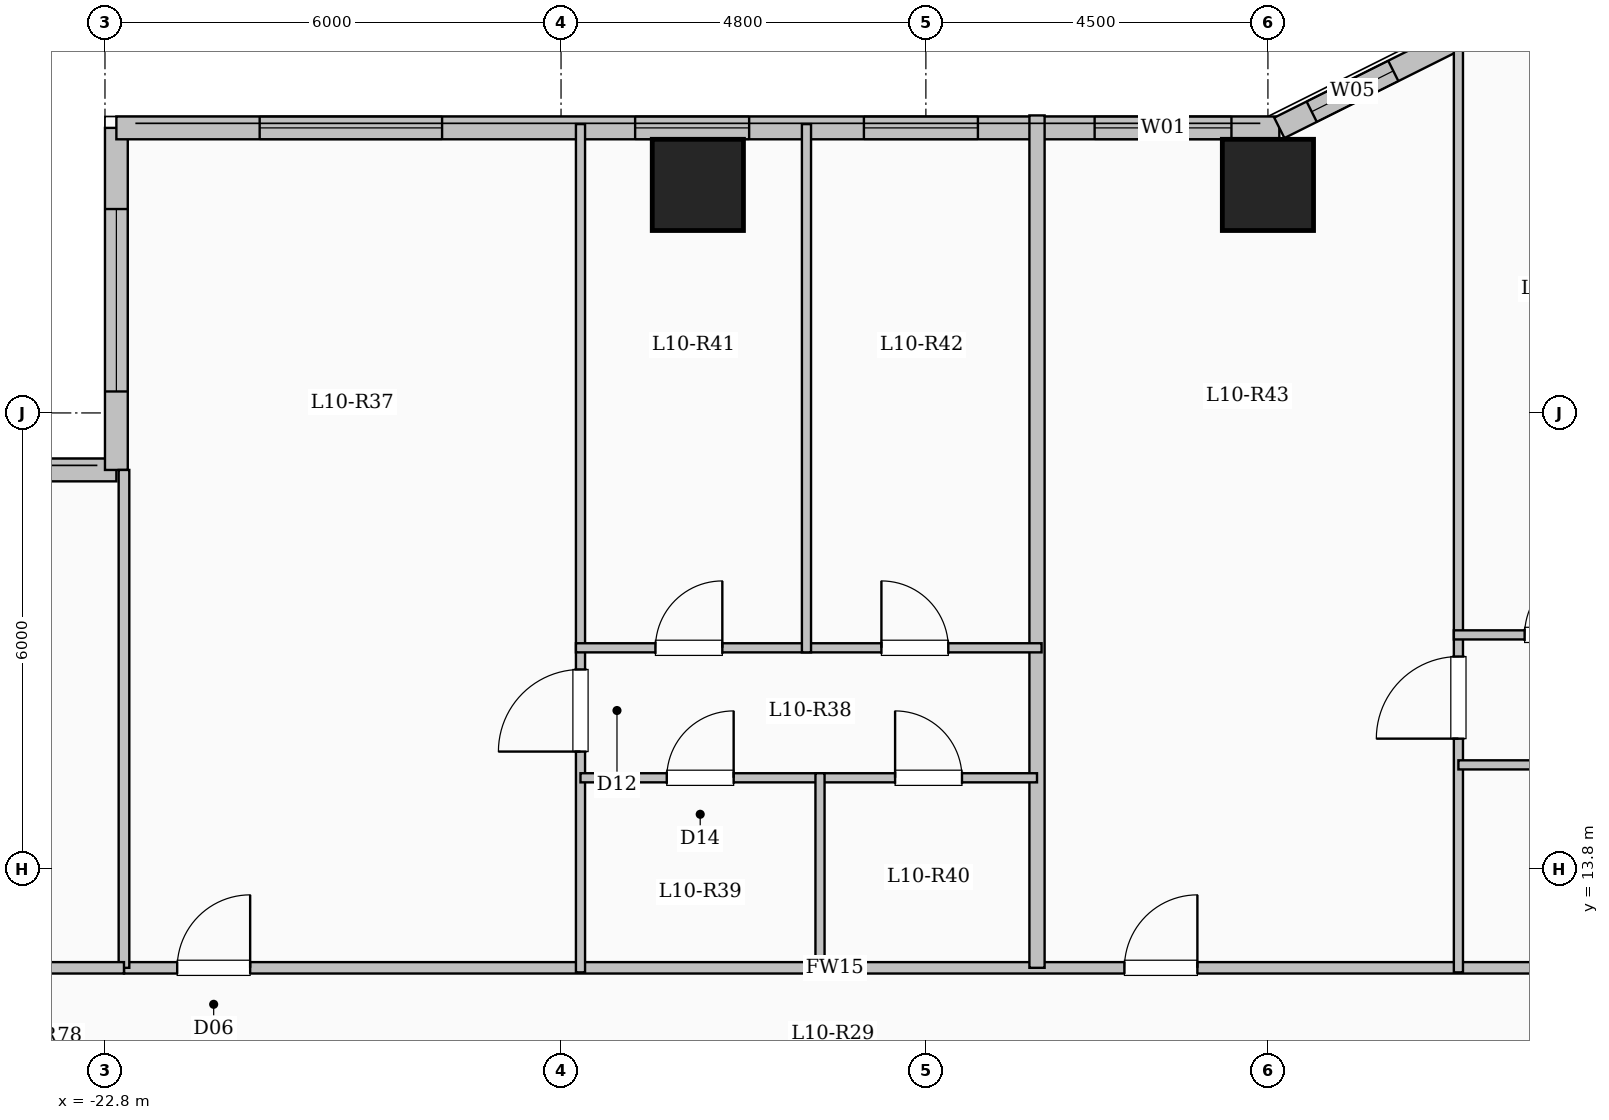
"""IFC4 building model, lengths in metres.
Left out: names, types, materials, properties, quantities, classifications, styles, units other than length and angle.
Written with IfcOpenShell. Run it as: python <this file> out.ifc"""

import sys

from ifc_helpers import new_model, si_unit, direction, frame, frame_2d, origin, origin_2d, place, context, subcontext, project, spatial, rectangle, extrude, element, fill, save


model = new_model("IFC4")
c1 = context("Model", 3, precision=1e-05, world=origin(), true_north=direction((0.0, 1.0)))
c2 = subcontext(c1, "Body", "Model", "MODEL_VIEW")
j1 = project(units=[si_unit("LENGTHUNIT", "METRE"), si_unit("PLANEANGLEUNIT", "RADIAN")], contexts=[c1])
p1 = place(None, origin())
s1 = spatial("IfcSite", under=j1, at=p1, CompositionType="ELEMENT")
p2 = place(p1, origin())
s2 = spatial("IfcBuilding", under=s1, at=p2, CompositionType="ELEMENT")
p3 = place(p2, frame((0.0, 0.0, 40.75)))
s3 = spatial("IfcBuildingStorey", under=s2, at=p3, CompositionType="ELEMENT", Elevation=40.75)
for number, where, z_axis, x_axis in (
    (1, (-15.0, 22.8, 0.0), (0.0, 0.0, 1.0), (1.0, 0.0, 0.0)),
    (2, (-7.5, 22.8, 0.0), (0.0, 0.0, 1.0), (1.0, 0.0, 0.0)),
):
    element("IfcColumn", number, at=place(p3, frame(where, z_axis=z_axis, x_axis=x_axis)), inside=s3, PredefinedType="COLUMN", context=c2, shape_type="SweptSolid", body=[
        extrude(rectangle(XDim=1.2, YDim=1.2, at=origin_2d()), origin(), (0.0, 0.0, 1.0), 3.35),
    ])
p4 = place(p3, frame((-28.65, 19.05, 0.0), z_axis=(0.0, 0.0, 1.0), x_axis=(1.0, 0.0, 0.0)))
e3 = element("IfcWall", 3, at=p4, inside=s3, PredefinedType="SOLIDWALL", context=c2, shape_type="SweptSolid", body=[
    extrude(rectangle(XDim=6.0, YDim=0.3, at=frame_2d((3.0, 0.0))), origin(), (0.0, 0.0, 1.0), 3.1),
])
p5 = place(p4, frame((2.025, 0.0, 0.9)))
e4 = element("IfcOpeningElement", 4, at=p5, cuts=e3, PredefinedType="OPENING", context=c2, shape_type="SweptSolid", body=[
    extrude(rectangle(XDim=2.0, YDim=1.7, at=frame_2d((1.0, 0.85))), frame((0.0, 0.16, 0.0), z_axis=(0.0, -1.0, 0.0), x_axis=(1.0, 0.0, 0.0)), (0.0, 0.0, 1.0), 0.32),
])
p6 = place(p3, frame((-22.65, 19.05, 0.0), z_axis=(0.0, 0.0, 1.0), x_axis=(0.0, 1.0, 0.0)))
e5 = element("IfcWall", 5, at=p6, inside=s3, PredefinedType="SOLIDWALL", context=c2, shape_type="SweptSolid", body=[
    extrude(rectangle(XDim=4.5, YDim=0.3, at=frame_2d((2.25, 0.0))), origin(), (0.0, 0.0, 1.0), 3.1),
])
p7 = place(p6, frame((1.032, 0.0, 0.9)))
e6 = element("IfcOpeningElement", 6, at=p7, cuts=e5, PredefinedType="OPENING", context=c2, shape_type="SweptSolid", body=[
    extrude(rectangle(XDim=2.4, YDim=1.8, at=frame_2d((1.2, 0.9))), frame((0.0, 0.16, 0.0), z_axis=(0.0, -1.0, 0.0), x_axis=(1.0, 0.0, 0.0)), (0.0, 0.0, 1.0), 0.32),
])
p8 = place(p3, frame((-22.65, 23.55, 0.0), z_axis=(0.0, 0.0, 1.0), x_axis=(1.0, 0.0, 0.0)))
e7 = element("IfcWall", 7, at=p8, inside=s3, PredefinedType="SOLIDWALL", context=c2, shape_type="SweptSolid", body=[
    extrude(rectangle(XDim=15.3, YDim=0.3, at=frame_2d((7.65, 0.0))), origin(), (0.0, 0.0, 1.0), 3.1),
])
p9 = place(p8, frame((1.885, 0.0, 0.9)))
e8 = element("IfcOpeningElement", 8, at=p9, cuts=e7, PredefinedType="OPENING", context=c2, shape_type="SweptSolid", body=[
    extrude(rectangle(XDim=2.4, YDim=1.8, at=frame_2d((1.2, 0.9))), frame((0.0, 0.16, 0.0), z_axis=(0.0, -1.0, 0.0), x_axis=(1.0, 0.0, 0.0)), (0.0, 0.0, 1.0), 0.32),
])
p10 = place(p8, frame((6.825, 0.0, 0.9)))
e9 = element("IfcOpeningElement", 9, at=p10, cuts=e7, PredefinedType="OPENING", context=c2, shape_type="SweptSolid", body=[
    extrude(rectangle(XDim=1.5, YDim=1.65, at=frame_2d((0.75, 0.825))), frame((0.0, 0.16, 0.0), z_axis=(0.0, -1.0, 0.0), x_axis=(1.0, 0.0, 0.0)), (0.0, 0.0, 1.0), 0.32),
])
p11 = place(p8, frame((9.835, 0.0, 0.9)))
e10 = element("IfcOpeningElement", 10, at=p11, cuts=e7, PredefinedType="OPENING", context=c2, shape_type="SweptSolid", body=[
    extrude(rectangle(XDim=1.5, YDim=1.65, at=frame_2d((0.75, 0.825))), frame((0.0, 0.16, 0.0), z_axis=(0.0, -1.0, 0.0), x_axis=(1.0, 0.0, 0.0)), (0.0, 0.0, 1.0), 0.32),
])
p12 = place(p8, frame((12.87, 0.0, 0.9)))
e11 = element("IfcOpeningElement", 11, at=p12, cuts=e7, PredefinedType="OPENING", context=c2, shape_type="SweptSolid", body=[
    extrude(rectangle(XDim=1.8, YDim=1.65, at=frame_2d((0.9, 0.825))), frame((0.0, 0.16, 0.0), z_axis=(0.0, -1.0, 0.0), x_axis=(1.0, 0.0, 0.0)), (0.0, 0.0, 1.0), 0.32),
])
p13 = place(p3, frame((-7.35, 23.55, 0.0), z_axis=(0.0, 0.0, 1.0), x_axis=(0.894427191, 0.4472135955, 0.0)))
e12 = element("IfcWall", 12, at=p13, inside=s3, PredefinedType="SOLIDWALL", context=c2, shape_type="SweptSolid", body=[
    extrude(rectangle(XDim=3.354, YDim=0.3, at=frame_2d((1.677, 0.0))), origin(), (0.0, 0.0, 1.0), 3.1),
])
p14 = place(p13, frame((0.476, 0.0, 0.95)))
e13 = element("IfcOpeningElement", 13, at=p14, cuts=e12, PredefinedType="OPENING", context=c2, shape_type="SweptSolid", body=[
    extrude(rectangle(XDim=1.2, YDim=1.5, at=frame_2d((0.6, 0.75))), frame((0.0, 0.16, 0.0), z_axis=(0.0, -1.0, 0.0), x_axis=(1.0, 0.0, 0.0)), (0.0, 0.0, 1.0), 0.32),
])
p15 = place(p3, frame((-22.55, 12.5, 0.0), z_axis=(0.0, 0.0, 1.0), x_axis=(1.0, 0.0, 0.0)))
e14 = element("IfcWall", 14, at=p15, inside=s3, PredefinedType="PARTITIONING", context=c2, shape_type="SweptSolid", body=[
    extrude(rectangle(XDim=18.7, YDim=0.15, at=frame_2d((9.35, 0.0))), origin(), (0.0, 0.0, 1.0), 3.1),
])
p16 = place(p15, frame((0.7, 0.0, 0.0)))
e15 = element("IfcOpeningElement", 15, at=p16, cuts=e14, PredefinedType="OPENING", context=c2, shape_type="SweptSolid", body=[
    extrude(rectangle(XDim=0.96, YDim=2.15, at=frame_2d((0.48, 1.075))), frame((0.0, 0.085, 0.0), z_axis=(0.0, -1.0, 0.0), x_axis=(1.0, 0.0, 0.0)), (0.0, 0.0, 1.0), 0.17),
])
p17 = place(p15, frame((13.162, 0.0, 0.0)))
e16 = element("IfcOpeningElement", 16, at=p17, cuts=e14, PredefinedType="OPENING", context=c2, shape_type="SweptSolid", body=[
    extrude(rectangle(XDim=0.96, YDim=2.15, at=frame_2d((0.48, 1.075))), frame((0.0, 0.085, 0.0), z_axis=(0.0, -1.0, 0.0), x_axis=(1.0, 0.0, 0.0)), (0.0, 0.0, 1.0), 0.17),
])
p18 = place(p3, frame((-10.538, 12.5, 0.0), z_axis=(0.0, 0.0, 1.0), x_axis=(0.0, 1.0, 0.0)))
e17 = element("IfcWall", 17, at=p18, inside=s3, PredefinedType="SOLIDWALL", context=c2, shape_type="SweptSolid", body=[
    extrude(rectangle(XDim=11.214, YDim=0.2, at=frame_2d((5.607, 0.0))), origin(), (0.0, 0.0, 1.0), 3.1),
])
p19 = place(p3, frame((-16.544, 12.44, 0.0), z_axis=(0.0, 0.0, 1.0), x_axis=(0.0, 1.0, 0.0)))
e18 = element("IfcWall", 18, at=p19, inside=s3, PredefinedType="PARTITIONING", context=c2, shape_type="SweptSolid", body=[
    extrude(rectangle(XDim=11.16, YDim=0.12, at=frame_2d((5.58, 0.0))), origin(), (0.0, 0.0, 1.0), 3.1),
])
p20 = place(p19, frame((2.905, 0.0, 0.0)))
e19 = element("IfcOpeningElement", 19, at=p20, cuts=e18, PredefinedType="OPENING", context=c2, shape_type="SweptSolid", body=[
    extrude(rectangle(XDim=1.08, YDim=2.15, at=frame_2d((0.54, 1.075))), frame((0.0, 0.07, 0.0), z_axis=(0.0, -1.0, 0.0), x_axis=(1.0, 0.0, 0.0)), (0.0, 0.0, 1.0), 0.14),
])
p21 = place(p3, frame((-16.544, 15.0, 0.0), z_axis=(0.0, 0.0, 1.0), x_axis=(1.0, 0.0, 0.0)))
e20 = element("IfcWall", 20, at=p21, inside=s3, PredefinedType="PARTITIONING", context=c2, shape_type="SweptSolid", body=[
    extrude(rectangle(XDim=3.151, YDim=0.12, at=frame_2d((1.575, 0.0))), origin(), (0.0, 0.0, 1.0), 2.585),
])
p22 = place(p21, frame((1.135, 0.0, 0.0)))
e21 = element("IfcOpeningElement", 21, at=p22, cuts=e20, PredefinedType="OPENING", context=c2, shape_type="SweptSolid", body=[
    extrude(rectangle(XDim=0.88, YDim=2.1, at=frame_2d((0.44, 1.05))), frame((0.0, 0.07, 0.0), z_axis=(0.0, -1.0, 0.0), x_axis=(1.0, 0.0, 0.0)), (0.0, 0.0, 1.0), 0.14),
])
p23 = place(p3, frame((-13.393, 15.0, 0.0), z_axis=(0.0, 0.0, 1.0), x_axis=(1.0, 0.0, 0.0)))
e22 = element("IfcWall", 22, at=p23, inside=s3, PredefinedType="PARTITIONING", context=c2, shape_type="SweptSolid", body=[
    extrude(rectangle(XDim=2.855, YDim=0.12, at=frame_2d((1.427, 0.0))), origin(), (0.0, 0.0, 1.0), 2.585),
])
p24 = place(p23, frame((0.988, 0.0, 0.0)))
e23 = element("IfcOpeningElement", 23, at=p24, cuts=e22, PredefinedType="OPENING", context=c2, shape_type="SweptSolid", body=[
    extrude(rectangle(XDim=0.88, YDim=2.1, at=frame_2d((0.44, 1.05))), frame((0.0, 0.07, 0.0), z_axis=(0.0, -1.0, 0.0), x_axis=(1.0, 0.0, 0.0)), (0.0, 0.0, 1.0), 0.14),
])
p25 = place(p3, frame((-16.604, 16.71, 0.0), z_axis=(0.0, 0.0, 1.0), x_axis=(1.0, 0.0, 0.0)))
e24 = element("IfcWall", 24, at=p25, inside=s3, PredefinedType="PARTITIONING", context=c2, shape_type="SweptSolid", body=[
    extrude(rectangle(XDim=6.126, YDim=0.12, at=frame_2d((3.063, 0.0))), origin(), (0.0, 0.0, 1.0), 2.585),
])
p26 = place(p25, frame((1.046, 0.0, 0.0)))
e25 = element("IfcOpeningElement", 25, at=p26, cuts=e24, PredefinedType="OPENING", context=c2, shape_type="SweptSolid", body=[
    extrude(rectangle(XDim=0.88, YDim=2.1, at=frame_2d((0.44, 1.05))), frame((0.0, 0.07, 0.0), z_axis=(0.0, -1.0, 0.0), x_axis=(1.0, 0.0, 0.0)), (0.0, 0.0, 1.0), 0.14),
])
p27 = place(p25, frame((4.019, 0.0, 0.0)))
e26 = element("IfcOpeningElement", 26, at=p27, cuts=e24, PredefinedType="OPENING", context=c2, shape_type="SweptSolid", body=[
    extrude(rectangle(XDim=0.88, YDim=2.1, at=frame_2d((0.44, 1.05))), frame((0.0, 0.07, 0.0), z_axis=(0.0, -1.0, 0.0), x_axis=(1.0, 0.0, 0.0)), (0.0, 0.0, 1.0), 0.14),
])
p28 = place(p3, frame((-13.393, 12.44, 0.0), z_axis=(0.0, 0.0, 1.0), x_axis=(0.0, 1.0, 0.0)))
e27 = element("IfcWall", 27, at=p28, inside=s3, PredefinedType="PARTITIONING", context=c2, shape_type="SweptSolid", body=[
    extrude(rectangle(XDim=2.62, YDim=0.12, at=frame_2d((1.31, 0.0))), origin(), (0.0, 0.0, 1.0), 3.1),
])
p29 = place(p3, frame((-13.571, 16.65, 0.0), z_axis=(0.0, 0.0, 1.0), x_axis=(0.0, 1.0, 0.0)))
e28 = element("IfcWall", 28, at=p29, inside=s3, PredefinedType="PARTITIONING", context=c2, shape_type="SweptSolid", body=[
    extrude(rectangle(XDim=6.95, YDim=0.12, at=frame_2d((3.475, 0.0))), origin(), (0.0, 0.0, 1.0), 3.1),
])
p30 = place(p3, frame((-4.994, 12.44, 0.0), z_axis=(0.0, 0.0, 1.0), x_axis=(0.0, 1.0, 0.0)))
e29 = element("IfcWall", 29, at=p30, inside=s3, PredefinedType="PARTITIONING", context=c2, shape_type="SweptSolid", body=[
    extrude(rectangle(XDim=12.64, YDim=0.12, at=frame_2d((6.32, 0.0))), origin(), (0.0, 0.0, 1.0), 3.1),
])
p31 = place(p30, frame((3.075, 0.0, 0.0)))
e30 = element("IfcOpeningElement", 30, at=p31, cuts=e29, PredefinedType="OPENING", context=c2, shape_type="SweptSolid", body=[
    extrude(rectangle(XDim=1.08, YDim=2.15, at=frame_2d((0.54, 1.075))), frame((0.0, 0.07, 0.0), z_axis=(0.0, -1.0, 0.0), x_axis=(1.0, 0.0, 0.0)), (0.0, 0.0, 1.0), 0.14),
])
p32 = place(p3, frame((-4.994, 15.17, 0.0), z_axis=(0.0, 0.0, 1.0), x_axis=(1.0, 0.0, 0.0)))
e31 = element("IfcWall", 31, at=p32, inside=s3, PredefinedType="PARTITIONING", context=c2, shape_type="SweptSolid", body=[
    extrude(rectangle(XDim=3.126, YDim=0.12, at=frame_2d((1.563, 0.0))), origin(), (0.0, 0.0, 1.0), 3.1),
])
p33 = place(p32, frame((1.123, 0.0, 0.0)))
e32 = element("IfcOpeningElement", 32, at=p33, cuts=e31, PredefinedType="OPENING", context=c2, shape_type="SweptSolid", body=[
    extrude(rectangle(XDim=0.88, YDim=2.1, at=frame_2d((0.44, 1.05))), frame((0.0, 0.07, 0.0), z_axis=(0.0, -1.0, 0.0), x_axis=(1.0, 0.0, 0.0)), (0.0, 0.0, 1.0), 0.14),
])
p34 = place(p3, frame((-5.054, 16.88, 0.0), z_axis=(0.0, 0.0, 1.0), x_axis=(1.0, 0.0, 0.0)))
e33 = element("IfcWall", 33, at=p34, inside=s3, PredefinedType="PARTITIONING", context=c2, shape_type="SweptSolid", body=[
    extrude(rectangle(XDim=5.664, YDim=0.12, at=frame_2d((2.832, 0.0))), origin(), (0.0, 0.0, 1.0), 3.1),
])
p35 = place(p34, frame((0.931, 0.0, 0.0)))
e34 = element("IfcOpeningElement", 34, at=p35, cuts=e33, PredefinedType="OPENING", context=c2, shape_type="SweptSolid", body=[
    extrude(rectangle(XDim=0.88, YDim=2.1, at=frame_2d((0.44, 1.05))), frame((0.0, 0.07, 0.0), z_axis=(0.0, -1.0, 0.0), x_axis=(1.0, 0.0, 0.0)), (0.0, 0.0, 1.0), 0.14),
])
p36 = place(p34, frame((3.673, 0.0, 0.0)))
e35 = element("IfcOpeningElement", 35, at=p36, cuts=e33, PredefinedType="OPENING", context=c2, shape_type="SweptSolid", body=[
    extrude(rectangle(XDim=0.88, YDim=2.1, at=frame_2d((0.44, 1.05))), frame((0.0, 0.07, 0.0), z_axis=(0.0, -1.0, 0.0), x_axis=(1.0, 0.0, 0.0)), (0.0, 0.0, 1.0), 0.14),
])
p37 = place(p3, frame((-22.55, 12.5, 0.0), z_axis=(0.0, 0.0, 1.0), x_axis=(0.0, 1.0, 0.0)))
e36 = element("IfcWall", 36, at=p37, inside=s3, PredefinedType="PARTITIONING", context=c2, shape_type="SweptSolid", body=[
    extrude(rectangle(XDim=6.55, YDim=0.14, at=frame_2d((3.275, 0.0))), origin(), (0.0, 0.0, 1.0), 3.1),
])
p38 = place(p3, frame((-28.68, 12.5, 0.0), z_axis=(0.0, 0.0, 1.0), x_axis=(1.0, 0.0, 0.0)))
e37 = element("IfcWall", 37, at=p38, inside=s3, PredefinedType="PARTITIONING", context=c2, shape_type="SweptSolid", body=[
    extrude(rectangle(XDim=6.13, YDim=0.15, at=frame_2d((3.065, 0.0))), origin(), (0.0, 0.0, 1.0), 3.1),
])
p39 = place(p38, frame((2.59, 0.0, 0.0)))
e38 = element("IfcOpeningElement", 38, at=p39, cuts=e37, PredefinedType="OPENING", context=c2, shape_type="SweptSolid", body=[
    extrude(rectangle(XDim=0.95, YDim=2.15, at=frame_2d((0.475, 1.075))), frame((0.0, 0.085, 0.0), z_axis=(0.0, -1.0, 0.0), x_axis=(1.0, 0.0, 0.0)), (0.0, 0.0, 1.0), 0.17),
])
p40 = place(p7, origin())
e39 = element("IfcWindow", 39, at=p40, inside=s3, PartitioningType="SINGLE_PANEL", PredefinedType="WINDOW", context=c2, shape_type="SweptSolid", body=[
    extrude(rectangle(XDim=2.4, YDim=1.8, at=frame_2d((1.2, 0.9))), frame((0.0, 0.03, 0.0), z_axis=(0.0, -1.0, 0.0), x_axis=(1.0, 0.0, 0.0)), (0.0, 0.0, 1.0), 0.06),
])
fill(e6, e39)
p41 = place(p9, origin())
e40 = element("IfcWindow", 40, at=p41, inside=s3, PartitioningType="SINGLE_PANEL", PredefinedType="WINDOW", context=c2, shape_type="SweptSolid", body=[
    extrude(rectangle(XDim=2.4, YDim=1.8, at=frame_2d((1.2, 0.9))), frame((0.0, 0.03, 0.0), z_axis=(0.0, -1.0, 0.0), x_axis=(1.0, 0.0, 0.0)), (0.0, 0.0, 1.0), 0.06),
])
fill(e8, e40)
p42 = place(p10, origin())
e41 = element("IfcWindow", 41, at=p42, inside=s3, PartitioningType="SINGLE_PANEL", PredefinedType="WINDOW", context=c2, shape_type="SweptSolid", body=[
    extrude(rectangle(XDim=1.5, YDim=1.65, at=frame_2d((0.75, 0.825))), frame((0.0, 0.03, 0.0), z_axis=(0.0, -1.0, 0.0), x_axis=(1.0, 0.0, 0.0)), (0.0, 0.0, 1.0), 0.06),
])
fill(e9, e41)
p43 = place(p11, origin())
e42 = element("IfcWindow", 42, at=p43, inside=s3, PartitioningType="SINGLE_PANEL", PredefinedType="WINDOW", context=c2, shape_type="SweptSolid", body=[
    extrude(rectangle(XDim=1.5, YDim=1.65, at=frame_2d((0.75, 0.825))), frame((0.0, 0.03, 0.0), z_axis=(0.0, -1.0, 0.0), x_axis=(1.0, 0.0, 0.0)), (0.0, 0.0, 1.0), 0.06),
])
fill(e10, e42)
p44 = place(p12, origin())
e43 = element("IfcWindow", 43, at=p44, inside=s3, PartitioningType="SINGLE_PANEL", PredefinedType="WINDOW", context=c2, shape_type="SweptSolid", body=[
    extrude(rectangle(XDim=1.8, YDim=1.65, at=frame_2d((0.9, 0.825))), frame((0.0, 0.03, 0.0), z_axis=(0.0, -1.0, 0.0), x_axis=(1.0, 0.0, 0.0)), (0.0, 0.0, 1.0), 0.06),
])
fill(e11, e43)
p45 = place(p14, origin())
e44 = element("IfcWindow", 44, at=p45, inside=s3, PartitioningType="SINGLE_PANEL", PredefinedType="WINDOW", context=c2, shape_type="SweptSolid", body=[
    extrude(rectangle(XDim=1.2, YDim=1.5, at=frame_2d((0.6, 0.75))), frame((0.0, 0.03, 0.0), z_axis=(0.0, -1.0, 0.0), x_axis=(1.0, 0.0, 0.0)), (0.0, 0.0, 1.0), 0.06),
])
fill(e13, e44)
p46 = place(p16, origin())
e45 = element("IfcDoor", 45, at=p46, inside=s3, OperationType="SINGLE_SWING_RIGHT", PredefinedType="DOOR", context=c2, shape_type="SweptSolid", body=[
    extrude(rectangle(XDim=0.96, YDim=2.15, at=frame_2d((0.48, 1.075))), frame((0.0, 0.025, 0.0), z_axis=(0.0, -1.0, 0.0), x_axis=(1.0, 0.0, 0.0)), (0.0, 0.0, 1.0), 0.05),
])
fill(e15, e45)
p47 = place(p20, origin())
e46 = element("IfcDoor", 46, at=p47, inside=s3, OperationType="SINGLE_SWING_LEFT", PredefinedType="DOOR", context=c2, shape_type="SweptSolid", body=[
    extrude(rectangle(XDim=1.08, YDim=2.15, at=frame_2d((0.54, 1.075))), frame((0.0, 0.025, 0.0), z_axis=(0.0, -1.0, 0.0), x_axis=(1.0, 0.0, 0.0)), (0.0, 0.0, 1.0), 0.05),
])
fill(e19, e46)
p48 = place(p22, origin())
e47 = element("IfcDoor", 47, at=p48, inside=s3, OperationType="SINGLE_SWING_RIGHT", PredefinedType="DOOR", context=c2, shape_type="SweptSolid", body=[
    extrude(rectangle(XDim=0.88, YDim=2.1, at=frame_2d((0.44, 1.05))), frame((0.0, 0.025, 0.0), z_axis=(0.0, -1.0, 0.0), x_axis=(1.0, 0.0, 0.0)), (0.0, 0.0, 1.0), 0.05),
])
fill(e21, e47)
p49 = place(p24, origin())
e48 = element("IfcDoor", 48, at=p49, inside=s3, OperationType="SINGLE_SWING_LEFT", PredefinedType="DOOR", context=c2, shape_type="SweptSolid", body=[
    extrude(rectangle(XDim=0.88, YDim=2.1, at=frame_2d((0.44, 1.05))), frame((0.0, 0.025, 0.0), z_axis=(0.0, -1.0, 0.0), x_axis=(1.0, 0.0, 0.0)), (0.0, 0.0, 1.0), 0.05),
])
fill(e23, e48)
p50 = place(p26, origin())
e49 = element("IfcDoor", 49, at=p50, inside=s3, OperationType="SINGLE_SWING_RIGHT", PredefinedType="DOOR", context=c2, shape_type="SweptSolid", body=[
    extrude(rectangle(XDim=0.88, YDim=2.1, at=frame_2d((0.44, 1.05))), frame((0.0, 0.025, 0.0), z_axis=(0.0, -1.0, 0.0), x_axis=(1.0, 0.0, 0.0)), (0.0, 0.0, 1.0), 0.05),
])
fill(e25, e49)
p51 = place(p27, origin())
e50 = element("IfcDoor", 50, at=p51, inside=s3, OperationType="SINGLE_SWING_LEFT", PredefinedType="DOOR", context=c2, shape_type="SweptSolid", body=[
    extrude(rectangle(XDim=0.88, YDim=2.1, at=frame_2d((0.44, 1.05))), frame((0.0, 0.025, 0.0), z_axis=(0.0, -1.0, 0.0), x_axis=(1.0, 0.0, 0.0)), (0.0, 0.0, 1.0), 0.05),
])
fill(e26, e50)
p52 = place(p17, origin())
e51 = element("IfcDoor", 51, at=p52, inside=s3, OperationType="SINGLE_SWING_RIGHT", PredefinedType="DOOR", context=c2, shape_type="SweptSolid", body=[
    extrude(rectangle(XDim=0.96, YDim=2.15, at=frame_2d((0.48, 1.075))), frame((0.0, 0.025, 0.0), z_axis=(0.0, -1.0, 0.0), x_axis=(1.0, 0.0, 0.0)), (0.0, 0.0, 1.0), 0.05),
])
fill(e16, e51)
p53 = place(p31, origin())
e52 = element("IfcDoor", 52, at=p53, inside=s3, OperationType="SINGLE_SWING_LEFT", PredefinedType="DOOR", context=c2, shape_type="SweptSolid", body=[
    extrude(rectangle(XDim=1.08, YDim=2.15, at=frame_2d((0.54, 1.075))), frame((0.0, 0.025, 0.0), z_axis=(0.0, -1.0, 0.0), x_axis=(1.0, 0.0, 0.0)), (0.0, 0.0, 1.0), 0.05),
])
fill(e30, e52)
p54 = place(p35, origin())
e53 = element("IfcDoor", 53, at=p54, inside=s3, OperationType="SINGLE_SWING_RIGHT", PredefinedType="DOOR", context=c2, shape_type="SweptSolid", body=[
    extrude(rectangle(XDim=0.88, YDim=2.1, at=frame_2d((0.44, 1.05))), frame((0.0, 0.025, 0.0), z_axis=(0.0, -1.0, 0.0), x_axis=(1.0, 0.0, 0.0)), (0.0, 0.0, 1.0), 0.05),
])
fill(e34, e53)
save(model, sys.argv[1])
